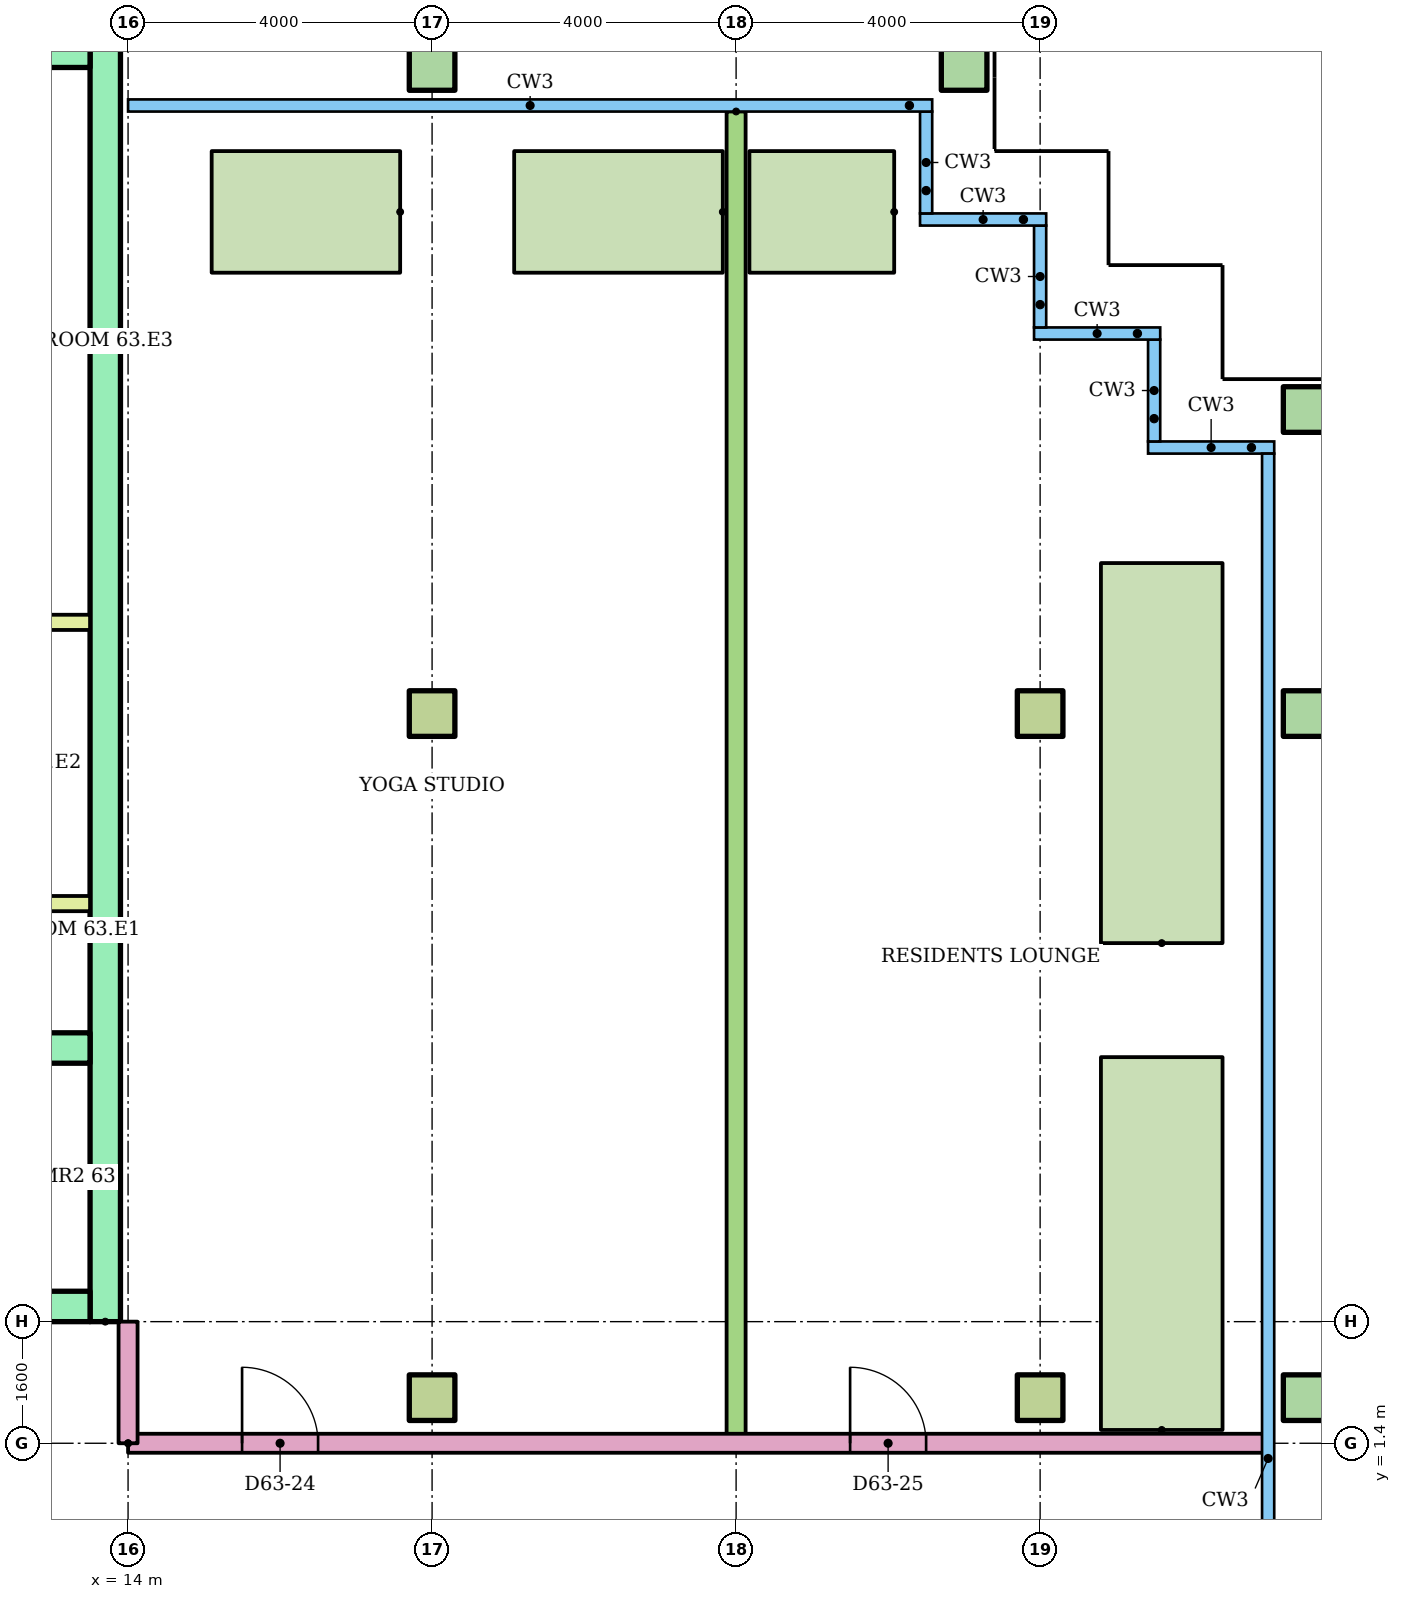
"""IFC4 building model, lengths in metres.
Left out: names, types, materials, properties, quantities, classifications, styles, units other than length and angle.
Written with IfcOpenShell. Run it as: python <this file> out.ifc"""

import sys

from ifc_helpers import new_model, si_unit, direction, frame, frame_2d, origin, origin_2d, place, context, subcontext, project, spatial, rectangle, hollow_rectangle, extrude, element, fill, save


model = new_model("IFC4")
c1 = context("Model", 3, precision=1e-05, world=origin(), true_north=direction((0.0, 1.0)))
c2 = subcontext(c1, "Body", "Model", "MODEL_VIEW")
j1 = project(units=[si_unit("LENGTHUNIT", "METRE"), si_unit("PLANEANGLEUNIT", "RADIAN")], contexts=[c1])
p1 = place(None, origin())
s1 = spatial("IfcSite", under=j1, at=p1, CompositionType="ELEMENT")
p2 = place(p1, origin())
s2 = spatial("IfcBuilding", under=s1, at=p2, CompositionType="ELEMENT")
p3 = place(p2, frame((0.0, 0.0, 239.6)))
s3 = spatial("IfcBuildingStorey", under=s2, at=p3, CompositionType="ELEMENT", Elevation=239.6)
for number, where in (
    (1, (18.0, 2.0, 0.0)),
    (2, (26.0, 2.0, 0.0)),
):
    element("IfcColumn", number, at=place(p3, frame(where)), inside=s3, PredefinedType="COLUMN", context=c2, shape_type="SweptSolid", body=[
        extrude(rectangle(XDim=0.6, YDim=0.6, at=origin_2d()), origin(), (0.0, 0.0, 1.0), 8.8),
    ])
p4 = place(p3, frame((29.5, 2.0, 0.0)))
e3 = element("IfcColumn", 3, at=p4, inside=s3, PredefinedType="COLUMN", context=c2, shape_type="SweptSolid", body=[
    extrude(hollow_rectangle(XDim=0.6, YDim=0.6, WallThickness=0.03, at=origin_2d()), origin(), (0.0, 0.0, 1.0), 8.8),
])
for number, where in (
    (4, (18.0, 11.0, 0.0)),
    (5, (26.0, 11.0, 0.0)),
):
    element("IfcColumn", number, at=place(p3, frame(where)), inside=s3, PredefinedType="COLUMN", context=c2, shape_type="SweptSolid", body=[
        extrude(rectangle(XDim=0.6, YDim=0.6, at=origin_2d()), origin(), (0.0, 0.0, 1.0), 8.8),
    ])
for number, where in (
    (6, (29.5, 11.0, 0.0)),
    (7, (29.5, 15.0, 0.0)),
    (8, (18.0, 19.5, 0.0)),
):
    element("IfcColumn", number, at=place(p3, frame(where)), inside=s3, PredefinedType="COLUMN", context=c2, shape_type="SweptSolid", body=[
        extrude(hollow_rectangle(XDim=0.6, YDim=0.6, WallThickness=0.03, at=origin_2d()), origin(), (0.0, 0.0, 1.0), 8.8),
    ])
p5 = place(p3, frame((25.0, 19.5, 0.0)))
e9 = element("IfcColumn", 9, at=p5, inside=s3, PredefinedType="COLUMN", context=c2, shape_type="SweptSolid", body=[
    extrude(hollow_rectangle(XDim=0.6, YDim=0.6, WallThickness=0.03, at=origin_2d()), origin(), (0.0, 0.0, 1.0), 9.25),
])
p6 = place(p3, frame((17.58, 17.6, 0.0), z_axis=(0.0, 0.0, 1.0), x_axis=(-1.0, 0.0, 0.0)))
e10 = element("IfcWall", 10, at=p6, inside=s3, PredefinedType="STANDARD", context=c2, shape_type="SweptSolid", body=[
    extrude(rectangle(XDim=2.48, YDim=1.6, at=frame_2d((1.24, 0.0))), origin(), (0.0, 0.0, 1.0), 0.8),
])
p7 = place(p3, frame((27.6, 7.98, 0.0), z_axis=(0.0, 0.0, 1.0), x_axis=(0.0, 1.0, 0.0)))
e11 = element("IfcWall", 11, at=p7, inside=s3, PredefinedType="STANDARD", context=c2, shape_type="SweptSolid", body=[
    extrude(rectangle(XDim=5.0, YDim=1.6, at=frame_2d((2.5, 0.0))), origin(), (0.0, 0.0, 1.0), 0.8),
])
p8 = place(p3, frame((13.7, 3.0, 0.0), z_axis=(0.0, 0.0, 1.0), x_axis=(0.0, 1.0, 0.0)))
e12 = element("IfcWall", 12, at=p8, inside=s3, PredefinedType="SHEAR", context=c2, shape_type="SweptSolid", body=[
    extrude(rectangle(XDim=17.0, YDim=0.4, at=frame_2d((8.5, 0.0))), origin(), (0.0, 0.0, 1.0), 8.8),
])
p9 = place(p3, frame((-13.5, 19.7, 0.0)))
e13 = element("IfcWall", 13, at=p9, inside=s3, PredefinedType="SHEAR", context=c2, shape_type="SweptSolid", body=[
    extrude(rectangle(XDim=27.0, YDim=0.4, at=frame_2d((13.5, 0.0))), origin(), (0.0, 0.0, 1.0), 8.8),
])
p10 = place(p3, frame((-13.5, 3.2, 0.0)))
e14 = element("IfcWall", 14, at=p10, inside=s3, PredefinedType="SHEAR", context=c2, shape_type="SweptSolid", body=[
    extrude(rectangle(XDim=27.0, YDim=0.4, at=frame_2d((13.5, 0.0))), origin(), (0.0, 0.0, 1.0), 8.8),
])
p11 = place(p10, frame((22.083, 0.0, 0.0)))
e15 = element("IfcOpeningElement", 15, at=p11, cuts=e14, PredefinedType="OPENING", context=c2, shape_type="SweptSolid", body=[
    extrude(rectangle(XDim=1.1, YDim=2.1, at=frame_2d((0.55, 1.05))), frame((0.0, 0.21, 0.0), z_axis=(0.0, -1.0, 0.0), x_axis=(1.0, 0.0, 0.0)), (0.0, 0.0, 1.0), 0.42),
])
p12 = place(p10, frame((25.128, 0.0, 0.0)))
e16 = element("IfcOpeningElement", 16, at=p12, cuts=e14, PredefinedType="OPENING", context=c2, shape_type="SweptSolid", body=[
    extrude(rectangle(XDim=1.1, YDim=2.1, at=frame_2d((0.55, 1.05))), frame((0.0, 0.21, 0.0), z_axis=(0.0, -1.0, 0.0), x_axis=(1.0, 0.0, 0.0)), (0.0, 0.0, 1.0), 0.42),
])
p13 = place(p10, frame((12.6, 0.0, 0.0)))
e17 = element("IfcOpeningElement", 17, at=p13, cuts=e14, PredefinedType="OPENING", context=c2, shape_type="SweptSolid", body=[
    extrude(rectangle(XDim=1.8, YDim=2.1, at=frame_2d((0.9, 1.05))), frame((0.0, 0.21, 0.0), z_axis=(0.0, -1.0, 0.0), x_axis=(1.0, 0.0, 0.0)), (0.0, 0.0, 1.0), 0.42),
])
p14 = place(p3, frame((1.522, 6.6, 0.0)))
e18 = element("IfcWall", 18, at=p14, inside=s3, PredefinedType="SHEAR", context=c2, shape_type="SweptSolid", body=[
    extrude(rectangle(XDim=11.978, YDim=0.4, at=frame_2d((5.989, 0.0))), origin(), (0.0, 0.0, 1.0), 8.8),
])
p15 = place(p14, frame((1.022, 0.0, 0.0)))
e19 = element("IfcOpeningElement", 19, at=p15, cuts=e18, PredefinedType="OPENING", context=c2, shape_type="SweptSolid", body=[
    extrude(rectangle(XDim=1.0, YDim=2.1, at=frame_2d((0.5, 1.05))), frame((0.0, 0.21, 0.0), z_axis=(0.0, -1.0, 0.0), x_axis=(1.0, 0.0, 0.0)), (0.0, 0.0, 1.0), 0.42),
])
p16 = place(p14, frame((4.067, 0.0, 0.0)))
e20 = element("IfcOpeningElement", 20, at=p16, cuts=e18, PredefinedType="OPENING", context=c2, shape_type="SweptSolid", body=[
    extrude(rectangle(XDim=1.0, YDim=2.1, at=frame_2d((0.5, 1.05))), frame((0.0, 0.21, 0.0), z_axis=(0.0, -1.0, 0.0), x_axis=(1.0, 0.0, 0.0)), (0.0, 0.0, 1.0), 0.42),
])
for number, where in (
    (21, (9.6, 8.5, 0.0)),
    (22, (9.6, 12.2, 0.0)),
):
    element("IfcWall", number, at=place(p3, frame(where)), inside=s3, PredefinedType="PARTITIONING", context=c2, shape_type="SweptSolid", body=[
        extrude(rectangle(XDim=3.9, YDim=0.2, at=frame_2d((1.95, 0.0))), origin(), (0.0, 0.0, 1.0), 8.8),
    ])
p17 = place(p3, frame((14.0, 1.4, 0.0)))
e23 = element("IfcWall", 23, at=p17, inside=s3, PredefinedType="PARTITIONING", context=c2, shape_type="SweptSolid", body=[
    extrude(rectangle(XDim=14.93, YDim=0.25, at=frame_2d((7.465, 0.0))), origin(), (0.0, 0.0, 1.0), 8.8),
])
p18 = place(p17, frame((1.5, 0.0, 0.0)))
e24 = element("IfcOpeningElement", 24, at=p18, cuts=e23, PredefinedType="OPENING", context=c2, shape_type="SweptSolid", body=[
    extrude(rectangle(XDim=1.0, YDim=2.1, at=frame_2d((0.5, 1.05))), frame((0.0, 0.135, 0.0), z_axis=(0.0, -1.0, 0.0), x_axis=(1.0, 0.0, 0.0)), (0.0, 0.0, 1.0), 0.27),
])
p19 = place(p17, frame((9.5, 0.0, 0.0)))
e25 = element("IfcOpeningElement", 25, at=p19, cuts=e23, PredefinedType="OPENING", context=c2, shape_type="SweptSolid", body=[
    extrude(rectangle(XDim=1.0, YDim=2.1, at=frame_2d((0.5, 1.05))), frame((0.0, 0.135, 0.0), z_axis=(0.0, -1.0, 0.0), x_axis=(1.0, 0.0, 0.0)), (0.0, 0.0, 1.0), 0.27),
])
p20 = place(p3, frame((22.0, 18.921, 0.0), z_axis=(0.0, 0.0, 1.0), x_axis=(0.0, -1.0, 0.0)))
e26 = element("IfcWall", 26, at=p20, inside=s3, PredefinedType="PARTITIONING", context=c2, shape_type="SweptSolid", body=[
    extrude(rectangle(XDim=17.521, YDim=0.25, at=frame_2d((8.76, 0.0))), origin(), (0.0, 0.0, 1.0), 8.8),
])
p21 = place(p3, frame((14.0, 1.4, 0.0), z_axis=(0.0, 0.0, 1.0), x_axis=(0.0, 1.0, 0.0)))
e27 = element("IfcWall", 27, at=p21, inside=s3, PredefinedType="PARTITIONING", context=c2, shape_type="SweptSolid", body=[
    extrude(rectangle(XDim=1.6, YDim=0.25, at=frame_2d((0.8, 0.0))), origin(), (0.0, 0.0, 1.0), 8.8),
])
p22 = place(p3, frame((24.08, 17.6, 0.0), z_axis=(0.0, 0.0, 1.0), x_axis=(-1.0, 0.0, 0.0)))
e28 = element("IfcWall", 28, at=p22, inside=s3, PredefinedType="STANDARD", context=c2, shape_type="SweptSolid", body=[
    extrude(rectangle(XDim=1.905, YDim=1.6, at=frame_2d((0.953, 0.0))), origin(), (0.0, 0.0, 1.0), 0.8),
])
p23 = place(p3, frame((21.825, 17.6, 0.0), z_axis=(0.0, 0.0, 1.0), x_axis=(-1.0, 0.0, 0.0)))
e29 = element("IfcWall", 29, at=p23, inside=s3, PredefinedType="STANDARD", context=c2, shape_type="SweptSolid", body=[
    extrude(rectangle(XDim=2.745, YDim=1.6, at=frame_2d((1.373, 0.0))), origin(), (0.0, 0.0, 1.0), 0.8),
])
p24 = place(p3, frame((27.6, 1.575, 0.0), z_axis=(0.0, 0.0, 1.0), x_axis=(0.0, 1.0, 0.0)))
e30 = element("IfcWall", 30, at=p24, inside=s3, PredefinedType="STANDARD", context=c2, shape_type="SweptSolid", body=[
    extrude(rectangle(XDim=4.905, YDim=1.6, at=frame_2d((2.453, 0.0))), origin(), (0.0, 0.0, 1.0), 0.8),
])
p25 = place(p18, origin())
e31 = element("IfcDoor", 31, at=p25, inside=s3, OperationType="SINGLE_SWING_LEFT", PredefinedType="DOOR", context=c2, shape_type="SweptSolid", body=[
    extrude(rectangle(XDim=1.0, YDim=2.1, at=frame_2d((0.5, 1.05))), frame((0.0, 0.025, 0.0), z_axis=(0.0, -1.0, 0.0), x_axis=(1.0, 0.0, 0.0)), (0.0, 0.0, 1.0), 0.05),
])
fill(e24, e31)
p26 = place(p19, origin())
e32 = element("IfcDoor", 32, at=p26, inside=s3, OperationType="SINGLE_SWING_LEFT", PredefinedType="DOOR", context=c2, shape_type="SweptSolid", body=[
    extrude(rectangle(XDim=1.0, YDim=2.1, at=frame_2d((0.5, 1.05))), frame((0.0, 0.025, 0.0), z_axis=(0.0, -1.0, 0.0), x_axis=(1.0, 0.0, 0.0)), (0.0, 0.0, 1.0), 0.05),
])
fill(e25, e32)
save(model, sys.argv[1])
